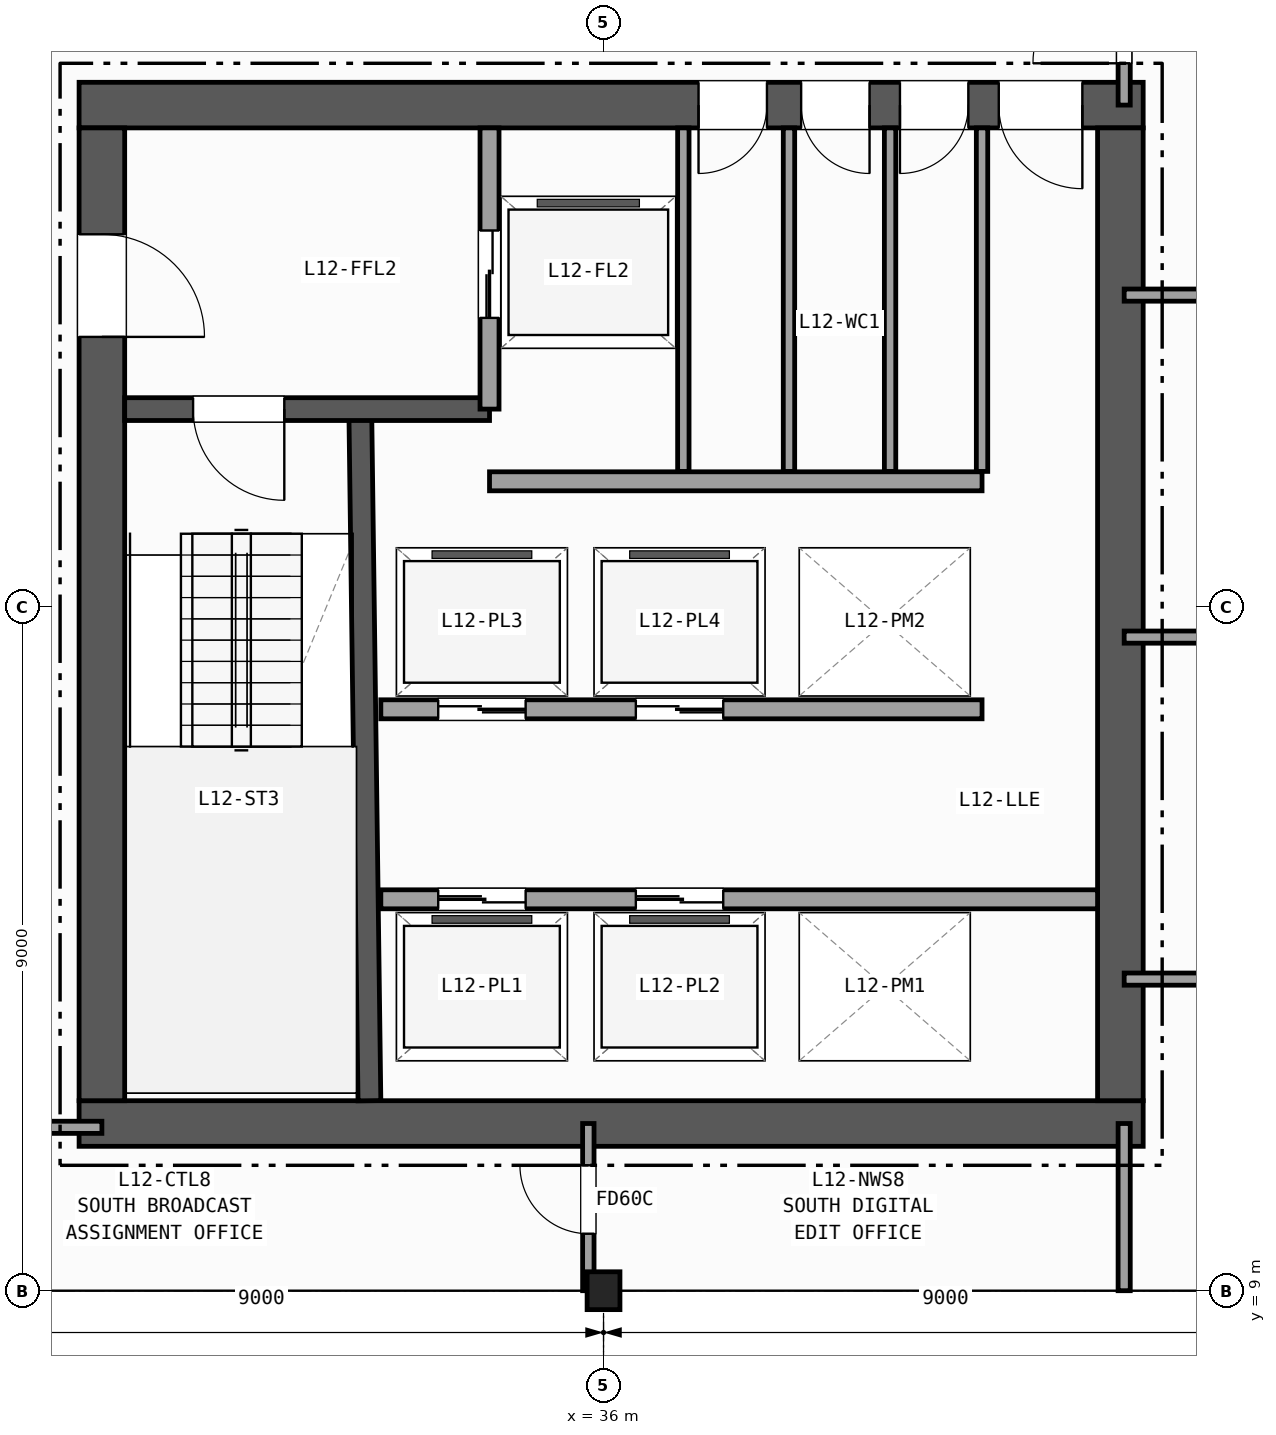
"""IFC4 building model, lengths in metres.
Left out: names, types, materials, properties, quantities, classifications, styles, units other than length and angle.
Written with IfcOpenShell. Run it as: python <this file> out.ifc"""

import sys

from ifc_helpers import new_model, si_unit, direction, frame, frame_2d, origin, origin_2d, place, context, subcontext, project, spatial, rectangle, i_section, extrude, element, fill, save


model = new_model("IFC4")
c1 = context("Model", 3, precision=1e-05, world=origin(), true_north=direction((0.0, 1.0)))
c2 = subcontext(c1, "Body", "Model", "MODEL_VIEW")
j1 = project(units=[si_unit("LENGTHUNIT", "METRE"), si_unit("PLANEANGLEUNIT", "RADIAN")], contexts=[c1])
p1 = place(None, origin())
s1 = spatial("IfcSite", under=j1, at=p1, CompositionType="ELEMENT")
p2 = place(p1, origin())
s2 = spatial("IfcBuilding", under=s1, at=p2, CompositionType="ELEMENT")
p3 = place(p2, frame((0.0, 0.0, 54.5)))
s3 = spatial("IfcBuildingStorey", under=s2, at=p3, CompositionType="ELEMENT", Elevation=54.5)
p4 = place(p3, frame((36.0, 9.0, 0.0), z_axis=(0.0, 0.0, 1.0), x_axis=(1.0, 0.0, 0.0)))
e1 = element("IfcColumn", 1, at=p4, inside=s3, PredefinedType="COLUMN", context=c2, shape_type="SweptSolid", body=[
    extrude(i_section(OverallWidth=0.432, OverallDepth=0.498, WebThickness=0.056, FlangeThickness=0.089, FilletRadius=0.015, at=origin_2d()), origin(), (0.0, 0.0, 1.0), 3.7),
])
p5 = place(p3, frame((29.1, 11.2, 0.0), z_axis=(0.0, 0.0, 1.0), x_axis=(1.0, 0.0, 0.0)))
e2 = element("IfcWall", 2, at=p5, inside=s3, PredefinedType="SHEAR", context=c2, shape_type="SweptSolid", body=[
    extrude(rectangle(XDim=14.0, YDim=0.6, at=frame_2d((7.0, 0.0))), origin(), (0.0, 0.0, 1.0), 3.42),
])
p6 = place(p3, frame((43.1, 24.6, 0.0), z_axis=(0.0, 0.0, 1.0), x_axis=(-1.0, 0.0, 0.0)))
e3 = element("IfcWall", 3, at=p6, inside=s3, PredefinedType="SHEAR", context=c2, shape_type="SweptSolid", body=[
    extrude(rectangle(XDim=14.0, YDim=0.6, at=frame_2d((7.0, 0.0))), origin(), (0.0, 0.0, 1.0), 3.42),
])
p7 = place(p6, frame((0.8, 0.0, 0.0)))
e4 = element("IfcOpeningElement", 4, at=p7, cuts=e3, PredefinedType="OPENING", context=c2, shape_type="SweptSolid", body=[
    extrude(rectangle(XDim=1.1, YDim=2.15, at=frame_2d((0.55, 1.075))), frame((0.0, 0.31, 0.0), z_axis=(0.0, -1.0, 0.0), x_axis=(1.0, 0.0, 0.0)), (0.0, 0.0, 1.0), 0.62),
])
p8 = place(p6, frame((2.3, 0.0, 0.0)))
e5 = element("IfcOpeningElement", 5, at=p8, cuts=e3, PredefinedType="OPENING", context=c2, shape_type="SweptSolid", body=[
    extrude(rectangle(XDim=0.9, YDim=2.1, at=frame_2d((0.45, 1.05))), frame((0.0, 0.31, 0.0), z_axis=(0.0, -1.0, 0.0), x_axis=(1.0, 0.0, 0.0)), (0.0, 0.0, 1.0), 0.62),
])
p9 = place(p6, frame((3.6, 0.0, 0.0)))
e6 = element("IfcOpeningElement", 6, at=p9, cuts=e3, PredefinedType="OPENING", context=c2, shape_type="SweptSolid", body=[
    extrude(rectangle(XDim=0.9, YDim=2.1, at=frame_2d((0.45, 1.05))), frame((0.0, 0.31, 0.0), z_axis=(0.0, -1.0, 0.0), x_axis=(1.0, 0.0, 0.0)), (0.0, 0.0, 1.0), 0.62),
])
p10 = place(p6, frame((4.95, 0.0, 0.0)))
e7 = element("IfcOpeningElement", 7, at=p10, cuts=e3, PredefinedType="OPENING", context=c2, shape_type="SweptSolid", body=[
    extrude(rectangle(XDim=0.9, YDim=2.1, at=frame_2d((0.45, 1.05))), frame((0.0, 0.31, 0.0), z_axis=(0.0, -1.0, 0.0), x_axis=(1.0, 0.0, 0.0)), (0.0, 0.0, 1.0), 0.62),
])
p11 = place(p3, frame((29.4, 24.3, 0.0), z_axis=(0.0, 0.0, 1.0), x_axis=(0.0, -1.0, 0.0)))
e8 = element("IfcWall", 8, at=p11, inside=s3, PredefinedType="SHEAR", context=c2, shape_type="SweptSolid", body=[
    extrude(rectangle(XDim=12.8, YDim=0.6, at=frame_2d((6.4, 0.0))), origin(), (0.0, 0.0, 1.0), 3.42),
])
p12 = place(p11, frame((1.4, 0.0, 0.0)))
e9 = element("IfcOpeningElement", 9, at=p12, cuts=e8, PredefinedType="OPENING", context=c2, shape_type="SweptSolid", body=[
    extrude(rectangle(XDim=1.35, YDim=2.15, at=frame_2d((0.675, 1.075))), frame((0.0, 0.31, 0.0), z_axis=(0.0, -1.0, 0.0), x_axis=(1.0, 0.0, 0.0)), (0.0, 0.0, 1.0), 0.62),
])
p13 = place(p3, frame((42.8, 11.5, 0.0), z_axis=(0.0, 0.0, 1.0), x_axis=(0.0, 1.0, 0.0)))
e10 = element("IfcWall", 10, at=p13, inside=s3, PredefinedType="SHEAR", context=c2, shape_type="SweptSolid", body=[
    extrude(rectangle(XDim=12.8, YDim=0.6, at=frame_2d((6.4, 0.0))), origin(), (0.0, 0.0, 1.0), 3.42),
])
p14 = place(p3, frame((32.92, 11.5, 0.0), z_axis=(0.0, 0.0, 1.0), x_axis=(-0.013244407292, 0.999912288991, 0.0)))
e11 = element("IfcWall", 11, at=p14, inside=s3, PredefinedType="SHEAR", context=c2, shape_type="SweptSolid", body=[
    extrude(rectangle(XDim=9.051, YDim=0.3, at=frame_2d((4.525, 0.0))), origin(), (0.0, 0.0, 1.0), 3.42),
])
p15 = place(p3, frame((34.5, 20.6, 0.0), z_axis=(0.0, 0.0, 1.0), x_axis=(-1.0, 0.0, 0.0)))
e12 = element("IfcWall", 12, at=p15, inside=s3, PredefinedType="SHEAR", context=c2, shape_type="SweptSolid", body=[
    extrude(rectangle(XDim=4.8, YDim=0.3, at=frame_2d((2.4, 0.0))), origin(), (0.0, 0.0, 1.0), 3.42),
])
p16 = place(p15, frame((2.7, 0.0, 0.0)))
e13 = element("IfcOpeningElement", 13, at=p16, cuts=e12, PredefinedType="OPENING", context=c2, shape_type="SweptSolid", body=[
    extrude(rectangle(XDim=1.2, YDim=2.15, at=frame_2d((0.6, 1.075))), frame((0.0, 0.16, 0.0), z_axis=(0.0, -1.0, 0.0), x_axis=(1.0, 0.0, 0.0)), (0.0, 0.0, 1.0), 0.32),
])
p17 = place(p3, frame((34.5, 20.6, 0.0), z_axis=(0.0, 0.0, 1.0), x_axis=(0.0, 1.0, 0.0)))
e14 = element("IfcWall", 14, at=p17, inside=s3, PredefinedType="PARTITIONING", context=c2, shape_type="SweptSolid", body=[
    extrude(rectangle(XDim=3.7, YDim=0.25, at=frame_2d((1.85, 0.0))), origin(), (0.0, 0.0, 1.0), 3.42),
])
p18 = place(p17, frame((1.2, 0.0, 0.0)))
e15 = element("IfcOpeningElement", 15, at=p18, cuts=e14, PredefinedType="OPENING", context=c2, shape_type="SweptSolid", body=[
    extrude(rectangle(XDim=1.15, YDim=2.15, at=frame_2d((0.575, 1.075))), frame((0.0, 0.135, 0.0), z_axis=(0.0, -1.0, 0.0), x_axis=(1.0, 0.0, 0.0)), (0.0, 0.0, 1.0), 0.27),
])
p19 = place(p3, frame((34.5, 19.65, 0.0), z_axis=(0.0, 0.0, 1.0), x_axis=(1.0, 0.0, 0.0)))
e16 = element("IfcWall", 16, at=p19, inside=s3, PredefinedType="PARTITIONING", context=c2, shape_type="SweptSolid", body=[
    extrude(rectangle(XDim=6.48, YDim=0.25, at=frame_2d((3.24, 0.0))), origin(), (0.0, 0.0, 1.0), 3.42),
])
p20 = place(p3, frame((33.07, 14.15, 0.0), z_axis=(0.0, 0.0, 1.0), x_axis=(1.0, 0.0, 0.0)))
e17 = element("IfcWall", 17, at=p20, inside=s3, PredefinedType="PARTITIONING", context=c2, shape_type="SweptSolid", body=[
    extrude(rectangle(XDim=9.43, YDim=0.25, at=frame_2d((4.715, 0.0))), origin(), (0.0, 0.0, 1.0), 3.42),
])
p21 = place(p20, frame((0.755, 0.0, 0.0)))
e18 = element("IfcOpeningElement", 18, at=p21, cuts=e17, PredefinedType="OPENING", context=c2, shape_type="SweptSolid", body=[
    extrude(rectangle(XDim=1.15, YDim=2.15, at=frame_2d((0.575, 1.075))), frame((0.0, 0.135, 0.0), z_axis=(0.0, -1.0, 0.0), x_axis=(1.0, 0.0, 0.0)), (0.0, 0.0, 1.0), 0.27),
])
p22 = place(p20, frame((3.355, 0.0, 0.0)))
e19 = element("IfcOpeningElement", 19, at=p22, cuts=e17, PredefinedType="OPENING", context=c2, shape_type="SweptSolid", body=[
    extrude(rectangle(XDim=1.15, YDim=2.15, at=frame_2d((0.575, 1.075))), frame((0.0, 0.135, 0.0), z_axis=(0.0, -1.0, 0.0), x_axis=(1.0, 0.0, 0.0)), (0.0, 0.0, 1.0), 0.27),
])
p23 = place(p3, frame((40.98, 16.65, 0.0), z_axis=(0.0, 0.0, 1.0), x_axis=(-1.0, 0.0, 0.0)))
e20 = element("IfcWall", 20, at=p23, inside=s3, PredefinedType="PARTITIONING", context=c2, shape_type="SweptSolid", body=[
    extrude(rectangle(XDim=7.91, YDim=0.25, at=frame_2d((3.955, 0.0))), origin(), (0.0, 0.0, 1.0), 3.42),
])
p24 = place(p23, frame((6.005, 0.0, 0.0)))
e21 = element("IfcOpeningElement", 21, at=p24, cuts=e20, PredefinedType="OPENING", context=c2, shape_type="SweptSolid", body=[
    extrude(rectangle(XDim=1.15, YDim=2.15, at=frame_2d((0.575, 1.075))), frame((0.0, 0.135, 0.0), z_axis=(0.0, -1.0, 0.0), x_axis=(1.0, 0.0, 0.0)), (0.0, 0.0, 1.0), 0.27),
])
p25 = place(p23, frame((3.405, 0.0, 0.0)))
e22 = element("IfcOpeningElement", 22, at=p25, cuts=e20, PredefinedType="OPENING", context=c2, shape_type="SweptSolid", body=[
    extrude(rectangle(XDim=1.15, YDim=2.15, at=frame_2d((0.575, 1.075))), frame((0.0, 0.135, 0.0), z_axis=(0.0, -1.0, 0.0), x_axis=(1.0, 0.0, 0.0)), (0.0, 0.0, 1.0), 0.27),
])
for number, where, z_axis, x_axis in (
    (23, (37.05, 19.78, 0.0), (0.0, 0.0, 1.0), (0.0, 1.0, 0.0)),
    (24, (38.44, 19.78, 0.0), (0.0, 0.0, 1.0), (0.0, 1.0, 0.0)),
    (25, (39.77, 19.78, 0.0), (0.0, 0.0, 1.0), (0.0, 1.0, 0.0)),
    (26, (40.98, 19.78, 0.0), (0.0, 0.0, 1.0), (0.0, 1.0, 0.0)),
):
    element("IfcWall", number, at=place(p3, frame(where, z_axis=z_axis, x_axis=x_axis)), inside=s3, PredefinedType="PARTITIONING", context=c2, shape_type="SweptSolid", body=[
        extrude(rectangle(XDim=4.52, YDim=0.15, at=frame_2d((2.26, 0.0))), origin(), (0.0, 0.0, 1.0), 3.42),
    ])
p26 = place(p3, frame((24.65, 11.15, 0.0), z_axis=(0.0, 0.0, 1.0), x_axis=(1.0, 0.0, 0.0)))
e27 = element("IfcWall", 27, at=p26, inside=s3, PredefinedType="PARTITIONING", context=c2, shape_type="SweptSolid", body=[
    extrude(rectangle(XDim=4.75, YDim=0.16, at=frame_2d((2.375, 0.0))), origin(), (0.0, 0.0, 1.0), 2.792),
])
p27 = place(p26, frame((1.2, 0.0, 0.0)))
e28 = element("IfcOpeningElement", 28, at=p27, cuts=e27, PredefinedType="OPENING", context=c2, shape_type="SweptSolid", body=[
    extrude(rectangle(XDim=1.0, YDim=2.1, at=frame_2d((0.5, 1.05))), frame((0.0, 0.09, 0.0), z_axis=(0.0, -1.0, 0.0), x_axis=(1.0, 0.0, 0.0)), (0.0, 0.0, 1.0), 0.18),
])
p28 = place(p3, frame((35.8, 9.0, 0.0), z_axis=(0.0, 0.0, 1.0), x_axis=(0.0, 1.0, 0.0)))
e29 = element("IfcWall", 29, at=p28, inside=s3, PredefinedType="PARTITIONING", context=c2, shape_type="SweptSolid", body=[
    extrude(rectangle(XDim=2.2, YDim=0.15, at=frame_2d((1.1, 0.0))), origin(), (0.0, 0.0, 1.0), 2.627),
])
p29 = place(p28, frame((0.75, 0.0, 0.0)))
e30 = element("IfcOpeningElement", 30, at=p29, cuts=e29, PredefinedType="OPENING", context=c2, shape_type="SweptSolid", body=[
    extrude(rectangle(XDim=0.9, YDim=2.1, at=frame_2d((0.45, 1.05))), frame((0.0, 0.085, 0.0), z_axis=(0.0, -1.0, 0.0), x_axis=(1.0, 0.0, 0.0)), (0.0, 0.0, 1.0), 0.17),
])
p30 = place(p3, frame((42.85, 9.0, 0.0), z_axis=(0.0, 0.0, 1.0), x_axis=(0.0, 1.0, 0.0)))
e31 = element("IfcWall", 31, at=p30, inside=s3, PredefinedType="PARTITIONING", context=c2, shape_type="SweptSolid", body=[
    extrude(rectangle(XDim=2.2, YDim=0.16, at=frame_2d((1.1, 0.0))), origin(), (0.0, 0.0, 1.0), 2.627),
])
p31 = place(p3, frame((42.85, 24.6, 0.0), z_axis=(0.0, 0.0, 1.0), x_axis=(0.0, 1.0, 0.0)))
e32 = element("IfcWall", 32, at=p31, inside=s3, PredefinedType="PARTITIONING", context=c2, shape_type="SweptSolid", body=[
    extrude(rectangle(XDim=2.4, YDim=0.16, at=frame_2d((1.2, 0.0))), origin(), (0.0, 0.0, 1.0), 2.627),
])
p32 = place(p31, frame((0.55, 0.0, 0.0)))
e33 = element("IfcOpeningElement", 33, at=p32, cuts=e32, PredefinedType="OPENING", context=c2, shape_type="SweptSolid", body=[
    extrude(rectangle(XDim=1.2, YDim=2.15, at=frame_2d((0.6, 1.075))), frame((0.0, 0.09, 0.0), z_axis=(0.0, -1.0, 0.0), x_axis=(1.0, 0.0, 0.0)), (0.0, 0.0, 1.0), 0.18),
])
p33 = place(p3, frame((42.85, 13.1, 0.0), z_axis=(0.0, 0.0, 1.0), x_axis=(1.0, 0.0, 0.0)))
e34 = element("IfcWall", 34, at=p33, inside=s3, PredefinedType="PARTITIONING", context=c2, shape_type="SweptSolid", body=[
    extrude(rectangle(XDim=20.346, YDim=0.16, at=frame_2d((10.173, 0.0))), origin(), (0.0, 0.0, 1.0), 3.42),
])
p34 = place(p33, frame((4.6, 0.0, 0.0)))
e35 = element("IfcOpeningElement", 35, at=p34, cuts=e34, PredefinedType="OPENING", context=c2, shape_type="SweptSolid", body=[
    extrude(rectangle(XDim=0.86, YDim=2.05, at=frame_2d((0.43, 1.025))), frame((0.0, 0.09, 0.0), z_axis=(0.0, -1.0, 0.0), x_axis=(1.0, 0.0, 0.0)), (0.0, 0.0, 1.0), 0.18),
])
p35 = place(p3, frame((42.85, 17.6, 0.0), z_axis=(0.0, 0.0, 1.0), x_axis=(1.0, 0.0, 0.0)))
e36 = element("IfcWall", 36, at=p35, inside=s3, PredefinedType="PARTITIONING", context=c2, shape_type="SweptSolid", body=[
    extrude(rectangle(XDim=20.809, YDim=0.16, at=frame_2d((10.404, 0.0))), origin(), (0.0, 0.0, 1.0), 3.42),
])
p36 = place(p35, frame((4.6, 0.0, 0.0)))
e37 = element("IfcOpeningElement", 37, at=p36, cuts=e36, PredefinedType="OPENING", context=c2, shape_type="SweptSolid", body=[
    extrude(rectangle(XDim=0.95, YDim=2.1, at=frame_2d((0.475, 1.05))), frame((0.0, 0.09, 0.0), z_axis=(0.0, -1.0, 0.0), x_axis=(1.0, 0.0, 0.0)), (0.0, 0.0, 1.0), 0.18),
])
p37 = place(p3, frame((42.85, 22.1, 0.0), z_axis=(0.0, 0.0, 1.0), x_axis=(1.0, 0.0, 0.0)))
e38 = element("IfcWall", 38, at=p37, inside=s3, PredefinedType="PARTITIONING", context=c2, shape_type="SweptSolid", body=[
    extrude(rectangle(XDim=20.428, YDim=0.16, at=frame_2d((10.214, 0.0))), origin(), (0.0, 0.0, 1.0), 3.42),
])
p38 = place(p37, frame((4.6, 0.0, 0.0)))
e39 = element("IfcOpeningElement", 39, at=p38, cuts=e38, PredefinedType="OPENING", context=c2, shape_type="SweptSolid", body=[
    extrude(rectangle(XDim=1.0, YDim=2.1, at=frame_2d((0.5, 1.05))), frame((0.0, 0.09, 0.0), z_axis=(0.0, -1.0, 0.0), x_axis=(1.0, 0.0, 0.0)), (0.0, 0.0, 1.0), 0.18),
])
p39 = place(p16, origin())
e40 = element("IfcDoor", 40, at=p39, inside=s3, OperationType="SINGLE_SWING_LEFT", PredefinedType="DOOR", context=c2, shape_type="SweptSolid", body=[
    extrude(rectangle(XDim=1.2, YDim=2.15, at=frame_2d((0.6, 1.075))), frame((0.0, 0.025, 0.0), z_axis=(0.0, -1.0, 0.0), x_axis=(1.0, 0.0, 0.0)), (0.0, 0.0, 1.0), 0.05),
])
fill(e13, e40)
p40 = place(p12, origin())
e41 = element("IfcDoor", 41, at=p40, inside=s3, OperationType="SINGLE_SWING_RIGHT", PredefinedType="DOOR", context=c2, shape_type="SweptSolid", body=[
    extrude(rectangle(XDim=1.35, YDim=2.15, at=frame_2d((0.675, 1.075))), frame((0.0, 0.025, 0.0), z_axis=(0.0, -1.0, 0.0), x_axis=(1.0, 0.0, 0.0)), (0.0, 0.0, 1.0), 0.05),
])
fill(e9, e41)
p41 = place(p7, origin())
e42 = element("IfcDoor", 42, at=p41, inside=s3, OperationType="SINGLE_SWING_LEFT", PredefinedType="DOOR", context=c2, shape_type="SweptSolid", body=[
    extrude(rectangle(XDim=1.1, YDim=2.15, at=frame_2d((0.55, 1.075))), frame((0.0, 0.025, 0.0), z_axis=(0.0, -1.0, 0.0), x_axis=(1.0, 0.0, 0.0)), (0.0, 0.0, 1.0), 0.05),
])
fill(e4, e42)
p42 = place(p8, origin())
e43 = element("IfcDoor", 43, at=p42, inside=s3, OperationType="SINGLE_SWING_RIGHT", PredefinedType="DOOR", context=c2, shape_type="SweptSolid", body=[
    extrude(rectangle(XDim=0.9, YDim=2.1, at=frame_2d((0.45, 1.05))), frame((0.0, 0.025, 0.0), z_axis=(0.0, -1.0, 0.0), x_axis=(1.0, 0.0, 0.0)), (0.0, 0.0, 1.0), 0.05),
])
fill(e5, e43)
p43 = place(p9, origin())
e44 = element("IfcDoor", 44, at=p43, inside=s3, OperationType="SINGLE_SWING_LEFT", PredefinedType="DOOR", context=c2, shape_type="SweptSolid", body=[
    extrude(rectangle(XDim=0.9, YDim=2.1, at=frame_2d((0.45, 1.05))), frame((0.0, 0.025, 0.0), z_axis=(0.0, -1.0, 0.0), x_axis=(1.0, 0.0, 0.0)), (0.0, 0.0, 1.0), 0.05),
])
fill(e6, e44)
p44 = place(p10, origin())
e45 = element("IfcDoor", 45, at=p44, inside=s3, OperationType="SINGLE_SWING_RIGHT", PredefinedType="DOOR", context=c2, shape_type="SweptSolid", body=[
    extrude(rectangle(XDim=0.9, YDim=2.1, at=frame_2d((0.45, 1.05))), frame((0.0, 0.025, 0.0), z_axis=(0.0, -1.0, 0.0), x_axis=(1.0, 0.0, 0.0)), (0.0, 0.0, 1.0), 0.05),
])
fill(e7, e45)
p45 = place(p18, origin())
e46 = element("IfcDoor", 46, at=p45, inside=s3, OperationType="DOUBLE_DOOR_SLIDING", PredefinedType="DOOR", context=c2, shape_type="SweptSolid", body=[
    extrude(rectangle(XDim=1.15, YDim=2.15, at=frame_2d((0.575, 1.075))), frame((0.0, 0.025, 0.0), z_axis=(0.0, -1.0, 0.0), x_axis=(1.0, 0.0, 0.0)), (0.0, 0.0, 1.0), 0.05),
])
fill(e15, e46)
p46 = place(p21, origin())
e47 = element("IfcDoor", 47, at=p46, inside=s3, OperationType="DOUBLE_DOOR_SLIDING", PredefinedType="DOOR", context=c2, shape_type="SweptSolid", body=[
    extrude(rectangle(XDim=1.15, YDim=2.15, at=frame_2d((0.575, 1.075))), frame((0.0, 0.025, 0.0), z_axis=(0.0, -1.0, 0.0), x_axis=(1.0, 0.0, 0.0)), (0.0, 0.0, 1.0), 0.05),
])
fill(e18, e47)
p47 = place(p22, origin())
e48 = element("IfcDoor", 48, at=p47, inside=s3, OperationType="DOUBLE_DOOR_SLIDING", PredefinedType="DOOR", context=c2, shape_type="SweptSolid", body=[
    extrude(rectangle(XDim=1.15, YDim=2.15, at=frame_2d((0.575, 1.075))), frame((0.0, 0.025, 0.0), z_axis=(0.0, -1.0, 0.0), x_axis=(1.0, 0.0, 0.0)), (0.0, 0.0, 1.0), 0.05),
])
fill(e19, e48)
p48 = place(p24, origin())
e49 = element("IfcDoor", 49, at=p48, inside=s3, OperationType="DOUBLE_DOOR_SLIDING", PredefinedType="DOOR", context=c2, shape_type="SweptSolid", body=[
    extrude(rectangle(XDim=1.15, YDim=2.15, at=frame_2d((0.575, 1.075))), frame((0.0, 0.025, 0.0), z_axis=(0.0, -1.0, 0.0), x_axis=(1.0, 0.0, 0.0)), (0.0, 0.0, 1.0), 0.05),
])
fill(e21, e49)
p49 = place(p25, origin())
e50 = element("IfcDoor", 50, at=p49, inside=s3, OperationType="DOUBLE_DOOR_SLIDING", PredefinedType="DOOR", context=c2, shape_type="SweptSolid", body=[
    extrude(rectangle(XDim=1.15, YDim=2.15, at=frame_2d((0.575, 1.075))), frame((0.0, 0.025, 0.0), z_axis=(0.0, -1.0, 0.0), x_axis=(1.0, 0.0, 0.0)), (0.0, 0.0, 1.0), 0.05),
])
fill(e22, e50)
p50 = place(p29, origin())
e51 = element("IfcDoor", 51, at=p50, inside=s3, OperationType="SINGLE_SWING_RIGHT", PredefinedType="DOOR", context=c2, shape_type="SweptSolid", body=[
    extrude(rectangle(XDim=0.9, YDim=2.1, at=frame_2d((0.45, 1.05))), frame((0.0, 0.025, 0.0), z_axis=(0.0, -1.0, 0.0), x_axis=(1.0, 0.0, 0.0)), (0.0, 0.0, 1.0), 0.05),
])
fill(e30, e51)
p51 = place(p32, origin())
e52 = element("IfcDoor", 52, at=p51, inside=s3, OperationType="SINGLE_SWING_LEFT", PredefinedType="DOOR", context=c2, shape_type="SweptSolid", body=[
    extrude(rectangle(XDim=1.2, YDim=2.15, at=frame_2d((0.6, 1.075))), frame((0.0, 0.025, 0.0), z_axis=(0.0, -1.0, 0.0), x_axis=(1.0, 0.0, 0.0)), (0.0, 0.0, 1.0), 0.05),
])
fill(e33, e52)
save(model, sys.argv[1])
